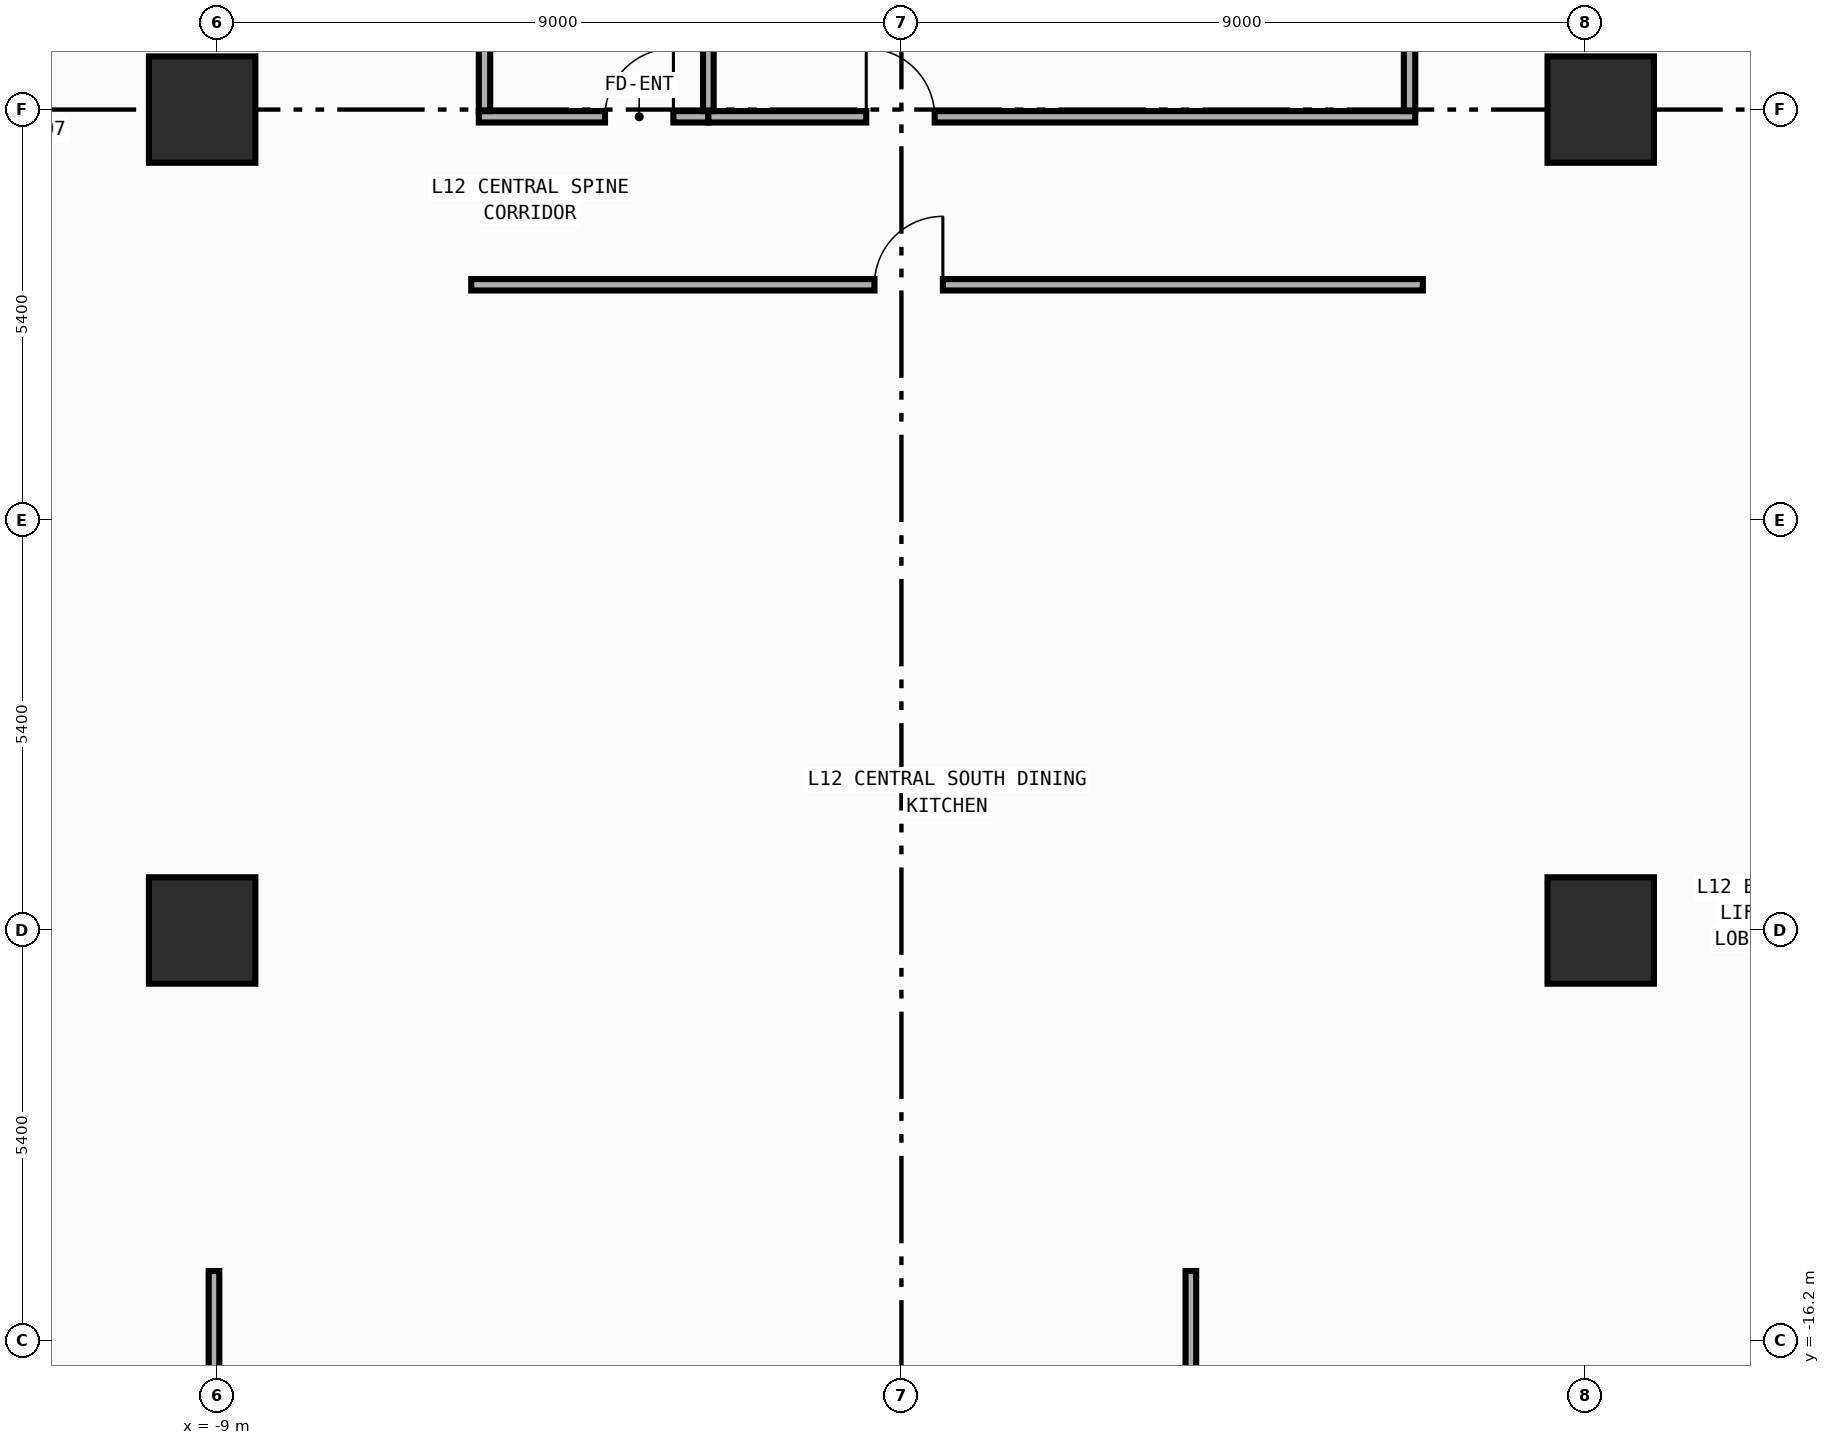
"""IFC4 building model, lengths in metres.
Left out: names, types, materials, properties, quantities, classifications, styles, units other than length and angle.
Written with IfcOpenShell. Run it as: python <this file> out.ifc"""

import sys

from ifc_helpers import new_model, si_unit, direction, frame, frame_2d, origin, origin_2d, place, context, subcontext, project, spatial, rectangle, extrude, element, fill, save


model = new_model("IFC4")
c1 = context("Model", 3, precision=1e-05, world=origin(), true_north=direction((0.0, 1.0)))
c2 = subcontext(c1, "Body", "Model", "MODEL_VIEW")
j1 = project(units=[si_unit("LENGTHUNIT", "METRE"), si_unit("PLANEANGLEUNIT", "RADIAN")], contexts=[c1])
p1 = place(None, origin())
s1 = spatial("IfcSite", under=j1, at=p1, CompositionType="ELEMENT")
p2 = place(p1, origin())
s2 = spatial("IfcBuilding", under=s1, at=p2, CompositionType="ELEMENT")
p3 = place(p2, frame((0.0, 0.0, 51.2)))
s3 = spatial("IfcBuildingStorey", under=s2, at=p3, CompositionType="ELEMENT", Elevation=51.2)
for number, where, z_axis, x_axis in (
    (1, (-9.2, -10.8, 0.0), (0.0, 0.0, 1.0), (1.0, 0.0, 0.0)),
    (2, (-9.2, 0.0, 0.0), (0.0, 0.0, 1.0), (1.0, 0.0, 0.0)),
    (3, (9.2, -10.8, 0.0), (0.0, 0.0, 1.0), (1.0, 0.0, 0.0)),
    (4, (9.2, 0.0, 0.0), (0.0, 0.0, 1.0), (1.0, 0.0, 0.0)),
):
    element("IfcColumn", number, at=place(p3, frame(where, z_axis=z_axis, x_axis=x_axis)), inside=s3, PredefinedType="COLUMN", context=c2, shape_type="SweptSolid", body=[
        extrude(rectangle(XDim=1.4, YDim=1.4, at=origin_2d()), origin(), (0.0, 0.0, 1.0), 4.2),
    ])
p4 = place(p3, frame((-5.56, -0.095, 0.0), z_axis=(0.0, 0.0, 1.0), x_axis=(1.0, 0.0, 0.0)))
e5 = element("IfcWall", 5, at=p4, inside=s3, PredefinedType="PARTITIONING", context=c2, shape_type="SweptSolid", body=[
    extrude(rectangle(XDim=3.02, YDim=0.15, at=frame_2d((1.51, 0.0))), origin(), (0.0, 0.0, 1.0), 3.14),
])
p5 = place(p4, frame((1.66, 0.0, 0.0)))
e6 = element("IfcOpeningElement", 6, at=p5, cuts=e5, PredefinedType="OPENING", context=c2, shape_type="SweptSolid", body=[
    extrude(rectangle(XDim=0.9, YDim=2.15, at=frame_2d((0.45, 1.075))), frame((0.0, 0.085, 0.0), z_axis=(0.0, -1.0, 0.0), x_axis=(1.0, 0.0, 0.0)), (0.0, 0.0, 1.0), 0.17),
])
p6 = place(p3, frame((-2.54, -0.095, 0.0), z_axis=(0.0, 0.0, 1.0), x_axis=(1.0, 0.0, 0.0)))
e7 = element("IfcWall", 7, at=p6, inside=s3, PredefinedType="PARTITIONING", context=c2, shape_type="SweptSolid", body=[
    extrude(rectangle(XDim=9.3, YDim=0.15, at=frame_2d((4.65, 0.0))), origin(), (0.0, 0.0, 1.0), 3.14),
])
p7 = place(p6, frame((2.077, 0.0, 0.0)))
e8 = element("IfcOpeningElement", 8, at=p7, cuts=e7, PredefinedType="OPENING", context=c2, shape_type="SweptSolid", body=[
    extrude(rectangle(XDim=0.9, YDim=2.15, at=frame_2d((0.45, 1.075))), frame((0.0, 0.085, 0.0), z_axis=(0.0, -1.0, 0.0), x_axis=(1.0, 0.0, 0.0)), (0.0, 0.0, 1.0), 0.17),
])
p8 = place(p3, frame((-5.66, -2.305, 0.0), z_axis=(0.0, 0.0, 1.0), x_axis=(1.0, 0.0, 0.0)))
e9 = element("IfcWall", 9, at=p8, inside=s3, PredefinedType="PARTITIONING", context=c2, shape_type="SweptSolid", body=[
    extrude(rectangle(XDim=12.52, YDim=0.15, at=frame_2d((6.26, 0.0))), origin(), (0.0, 0.0, 1.0), 3.94),
])
p9 = place(p8, frame((5.305, 0.0, 0.0)))
e10 = element("IfcOpeningElement", 10, at=p9, cuts=e9, PredefinedType="OPENING", context=c2, shape_type="SweptSolid", body=[
    extrude(rectangle(XDim=0.9, YDim=2.15, at=frame_2d((0.45, 1.075))), frame((0.0, 0.085, 0.0), z_axis=(0.0, -1.0, 0.0), x_axis=(1.0, 0.0, 0.0)), (0.0, 0.0, 1.0), 0.17),
])
p10 = place(p3, frame((-5.485, -0.02, 0.0), z_axis=(0.0, 0.0, 1.0), x_axis=(0.0, 1.0, 0.0)))
e11 = element("IfcWall", 11, at=p10, inside=s3, PredefinedType="PARTITIONING", context=c2, shape_type="SweptSolid", body=[
    extrude(rectangle(XDim=3.3, YDim=0.15, at=frame_2d((1.65, 0.0))), origin(), (0.0, 0.0, 1.0), 3.94),
])
p11 = place(p10, frame((1.94, 0.0, 0.0)))
e12 = element("IfcOpeningElement", 12, at=p11, cuts=e11, PredefinedType="OPENING", context=c2, shape_type="SweptSolid", body=[
    extrude(rectangle(XDim=0.9, YDim=2.15, at=frame_2d((0.45, 1.075))), frame((0.0, 0.085, 0.0), z_axis=(0.0, -1.0, 0.0), x_axis=(1.0, 0.0, 0.0)), (0.0, 0.0, 1.0), 0.17),
])
p12 = place(p3, frame((6.685, -0.02, 0.0), z_axis=(0.0, 0.0, 1.0), x_axis=(0.0, 1.0, 0.0)))
e13 = element("IfcWall", 13, at=p12, inside=s3, PredefinedType="PARTITIONING", context=c2, shape_type="SweptSolid", body=[
    extrude(rectangle(XDim=15.405, YDim=0.15, at=frame_2d((7.703, 0.0))), origin(), (0.0, 0.0, 1.0), 3.94),
])
p13 = place(p12, frame((4.921, 0.0, 0.0)))
e14 = element("IfcOpeningElement", 14, at=p13, cuts=e13, PredefinedType="OPENING", context=c2, shape_type="SweptSolid", body=[
    extrude(rectangle(XDim=0.9, YDim=2.15, at=frame_2d((0.45, 1.075))), frame((0.0, 0.085, 0.0), z_axis=(0.0, -1.0, 0.0), x_axis=(1.0, 0.0, 0.0)), (0.0, 0.0, 1.0), 0.17),
])
p14 = place(p3, frame((-9.044, -26.809, 0.0), z_axis=(0.0, 0.0, 1.0), x_axis=(0.0, 1.0, 0.0)))
e15 = element("IfcWall", 15, at=p14, inside=s3, PredefinedType="PARTITIONING", context=c2, shape_type="SweptSolid", body=[
    extrude(rectangle(XDim=11.529, YDim=0.14, at=frame_2d((5.764, 0.0))), origin(), (0.0, 0.0, 1.0), 3.14),
])
p15 = place(p14, frame((0.46, 0.0, 0.0)))
e16 = element("IfcOpeningElement", 16, at=p15, cuts=e15, PredefinedType="OPENING", context=c2, shape_type="SweptSolid", body=[
    extrude(rectangle(XDim=0.85, YDim=2.1, at=frame_2d((0.425, 1.05))), frame((0.0, 0.08, 0.0), z_axis=(0.0, -1.0, 0.0), x_axis=(1.0, 0.0, 0.0)), (0.0, 0.0, 1.0), 0.16),
])
p16 = place(p3, frame((3.808, -26.746, 0.0), z_axis=(0.0, 0.0, 1.0), x_axis=(0.0, 1.0, 0.0)))
e17 = element("IfcWall", 17, at=p16, inside=s3, PredefinedType="PARTITIONING", context=c2, shape_type="SweptSolid", body=[
    extrude(rectangle(XDim=11.466, YDim=0.14, at=frame_2d((5.733, 0.0))), origin(), (0.0, 0.0, 1.0), 3.94),
])
p17 = place(p16, frame((0.46, 0.0, 0.0)))
e18 = element("IfcOpeningElement", 18, at=p17, cuts=e17, PredefinedType="OPENING", context=c2, shape_type="SweptSolid", body=[
    extrude(rectangle(XDim=0.85, YDim=2.1, at=frame_2d((0.425, 1.05))), frame((0.0, 0.08, 0.0), z_axis=(0.0, -1.0, 0.0), x_axis=(1.0, 0.0, 0.0)), (0.0, 0.0, 1.0), 0.16),
])
p18 = place(p3, frame((-2.54, -0.02, 0.0), z_axis=(0.0, 0.0, 1.0), x_axis=(0.0, 1.0, 0.0)))
e19 = element("IfcWall", 19, at=p18, inside=s3, PredefinedType="PARTITIONING", context=c2, shape_type="SweptSolid", body=[
    extrude(rectangle(XDim=3.3, YDim=0.14, at=frame_2d((1.65, 0.0))), origin(), (0.0, 0.0, 1.0), 3.94),
])
p19 = place(p5, origin())
e20 = element("IfcDoor", 20, at=p19, inside=s3, OperationType="SINGLE_SWING_RIGHT", PredefinedType="DOOR", context=c2, shape_type="SweptSolid", body=[
    extrude(rectangle(XDim=0.9, YDim=2.15, at=frame_2d((0.45, 1.075))), frame((0.0, 0.025, 0.0), z_axis=(0.0, -1.0, 0.0), x_axis=(1.0, 0.0, 0.0)), (0.0, 0.0, 1.0), 0.05),
])
fill(e6, e20)
p20 = place(p7, origin())
e21 = element("IfcDoor", 21, at=p20, inside=s3, OperationType="SINGLE_SWING_LEFT", PredefinedType="DOOR", context=c2, shape_type="SweptSolid", body=[
    extrude(rectangle(XDim=0.9, YDim=2.15, at=frame_2d((0.45, 1.075))), frame((0.0, 0.025, 0.0), z_axis=(0.0, -1.0, 0.0), x_axis=(1.0, 0.0, 0.0)), (0.0, 0.0, 1.0), 0.05),
])
fill(e8, e21)
p21 = place(p9, origin())
e22 = element("IfcDoor", 22, at=p21, inside=s3, OperationType="SINGLE_SWING_RIGHT", PredefinedType="DOOR", context=c2, shape_type="SweptSolid", body=[
    extrude(rectangle(XDim=0.9, YDim=2.15, at=frame_2d((0.45, 1.075))), frame((0.0, 0.025, 0.0), z_axis=(0.0, -1.0, 0.0), x_axis=(1.0, 0.0, 0.0)), (0.0, 0.0, 1.0), 0.05),
])
fill(e10, e22)
save(model, sys.argv[1])
